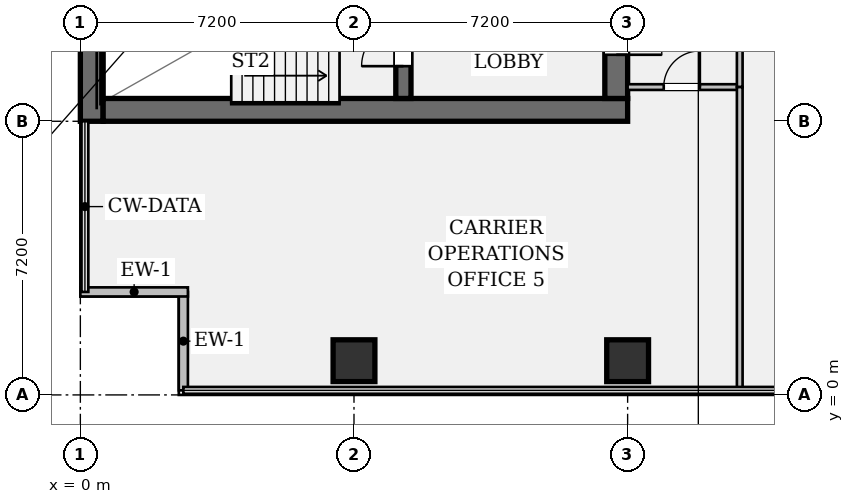
"""IFC4 building model, lengths in metres.
Left out: names, types, materials, properties, quantities, classifications, styles, units other than length and angle.
Written with IfcOpenShell. Run it as: python <this file> out.ifc"""

import sys

from ifc_helpers import new_model, si_unit, direction, frame, frame_2d, origin, origin_2d, place, context, subcontext, project, spatial, rectangle, hollow_rectangle, extrude, element, fill, save


model = new_model("IFC4")
c1 = context("Model", 3, precision=1e-05, world=origin(), true_north=direction((0.0, 1.0)))
c2 = subcontext(c1, "Body", "Model", "MODEL_VIEW")
j1 = project(units=[si_unit("LENGTHUNIT", "METRE"), si_unit("PLANEANGLEUNIT", "RADIAN")], contexts=[c1])
p1 = place(None, origin())
s1 = spatial("IfcSite", under=j1, at=p1, CompositionType="ELEMENT")
p2 = place(p1, origin())
s2 = spatial("IfcBuilding", under=s1, at=p2, CompositionType="ELEMENT")
p3 = place(p2, frame((0.0, 0.0, 31.15)))
s3 = spatial("IfcBuildingStorey", under=s2, at=p3, CompositionType="ELEMENT", Elevation=31.15)
p4 = place(p3, frame((0.3, 7.2, 0.0), z_axis=(0.0, 0.0, 1.0), x_axis=(0.0, 1.0, 0.0)))
e1 = element("IfcWall", 1, at=p4, inside=s3, PredefinedType="SHEAR", context=c2, shape_type="SweptSolid", body=[
    extrude(rectangle(XDim=28.8, YDim=0.6, at=frame_2d((14.4, 0.0))), origin(), (0.0, 0.0, 1.0), 3.57),
])
p5 = place(p3, frame((0.6, 7.5, 0.0), z_axis=(0.0, 0.0, 1.0), x_axis=(1.0, 0.0, 0.0)))
e2 = element("IfcWall", 2, at=p5, inside=s3, PredefinedType="SHEAR", context=c2, shape_type="SweptSolid", body=[
    extrude(rectangle(XDim=13.8, YDim=0.6, at=frame_2d((6.9, 0.0))), origin(), (0.0, 0.0, 1.0), 3.57),
])
p6 = place(p3, frame((14.1, 35.4, 0.0), z_axis=(0.0, 0.0, 1.0), x_axis=(0.0, -1.0, 0.0)))
e3 = element("IfcWall", 3, at=p6, inside=s3, PredefinedType="SHEAR", context=c2, shape_type="SweptSolid", body=[
    extrude(rectangle(XDim=27.6, YDim=0.6, at=frame_2d((13.8, 0.0))), origin(), (0.0, 0.0, 1.0), 3.57),
])
p7 = place(p6, frame((1.3, 0.0, 0.0)))
e4 = element("IfcOpeningElement", 4, at=p7, cuts=e3, PredefinedType="OPENING", context=c2, shape_type="SweptSolid", body=[
    extrude(rectangle(XDim=1.2, YDim=2.15, at=frame_2d((0.6, 1.075))), frame((0.0, 0.312, 0.0), z_axis=(0.0, -1.0, 0.0), x_axis=(1.0, 0.0, 0.0)), (0.0, 0.0, 1.0), 0.624),
])
p8 = place(p6, frame((25.25, 0.0, 0.0)))
e5 = element("IfcOpeningElement", 5, at=p8, cuts=e3, PredefinedType="OPENING", context=c2, shape_type="SweptSolid", body=[
    extrude(rectangle(XDim=1.2, YDim=2.15, at=frame_2d((0.6, 1.075))), frame((0.0, 0.312, 0.0), z_axis=(0.0, -1.0, 0.0), x_axis=(1.0, 0.0, 0.0)), (0.0, 0.0, 1.0), 0.624),
])
p9 = place(p6, frame((14.6, 0.0, 0.0)))
e6 = element("IfcOpeningElement", 6, at=p9, cuts=e3, PredefinedType="OPENING", context=c2, shape_type="SweptSolid", body=[
    extrude(rectangle(XDim=1.6, YDim=2.2, at=frame_2d((0.8, 1.1))), frame((0.0, 0.312, 0.0), z_axis=(0.0, -1.0, 0.0), x_axis=(1.0, 0.0, 0.0)), (0.0, 0.0, 1.0), 0.624),
])
p10 = place(p3, frame((8.5, 7.8, 0.0), z_axis=(0.0, 0.0, 1.0), x_axis=(0.0, 1.0, 0.0)))
e7 = element("IfcWall", 7, at=p10, inside=s3, PredefinedType="SHEAR", context=c2, shape_type="SweptSolid", body=[
    extrude(rectangle(XDim=3.68, YDim=0.4, at=frame_2d((1.84, 0.0))), origin(), (0.0, 0.0, 1.0), 3.57),
])
p11 = place(p10, frame((0.85, 0.0, 0.0)))
e8 = element("IfcOpeningElement", 8, at=p11, cuts=e7, PredefinedType="OPENING", context=c2, shape_type="SweptSolid", body=[
    extrude(rectangle(XDim=1.1, YDim=2.15, at=frame_2d((0.55, 1.075))), frame((0.0, 0.212, 0.0), z_axis=(0.0, -1.0, 0.0), x_axis=(1.0, 0.0, 0.0)), (0.0, 0.0, 1.0), 0.424),
])
for number, where, z_axis, x_axis in (
    (9, (7.2, 0.9, 0.0), (0.0, 0.0, 1.0), (1.0, 0.0, 0.0)),
    (10, (14.4, 0.9, 0.0), (0.0, 0.0, 1.0), (1.0, 0.0, 0.0)),
):
    element("IfcColumn", number, at=place(p3, frame(where, z_axis=z_axis, x_axis=x_axis)), inside=s3, PredefinedType="COLUMN", context=c2, shape_type="SweptSolid", body=[
        extrude(hollow_rectangle(XDim=1.1, YDim=1.1, WallThickness=0.07, at=origin_2d()), origin(), (0.0, 0.0, 1.0), 3.57),
    ])
p12 = place(p3, frame((2.71, 0.12, 0.0), z_axis=(0.0, 0.0, 1.0), x_axis=(0.0, 1.0, 0.0)))
e11 = element("IfcWall", 11, at=p12, inside=s3, PredefinedType="STANDARD", context=c2, shape_type="SweptSolid", body=[
    extrude(rectangle(XDim=2.59, YDim=0.24, at=frame_2d((1.295, 0.0))), origin(), (0.0, 0.0, 1.0), 3.57),
])
p13 = place(p3, frame((2.83, 2.71, 0.0), z_axis=(0.0, 0.0, 1.0), x_axis=(-1.0, 0.0, 0.0)))
e12 = element("IfcWall", 12, at=p13, inside=s3, PredefinedType="STANDARD", context=c2, shape_type="SweptSolid", body=[
    extrude(rectangle(XDim=2.83, YDim=0.24, at=frame_2d((1.415, 0.0))), origin(), (0.0, 0.0, 1.0), 3.57),
])
p14 = place(p3, frame((14.4, 8.1, 0.0), z_axis=(0.0, 0.0, 1.0), x_axis=(1.0, 0.0, 0.0)))
e13 = element("IfcWall", 13, at=p14, inside=s3, PredefinedType="PARTITIONING", context=c2, shape_type="SweptSolid", body=[
    extrude(rectangle(XDim=2.95, YDim=0.15, at=frame_2d((1.475, 0.0))), origin(), (0.0, 0.0, 1.0), 2.628),
])
p15 = place(p14, frame((0.95, 0.0, 0.0)))
e14 = element("IfcOpeningElement", 14, at=p15, cuts=e13, PredefinedType="OPENING", context=c2, shape_type="SweptSolid", body=[
    extrude(rectangle(XDim=0.95, YDim=2.15, at=frame_2d((0.475, 1.075))), frame((0.0, 0.087, 0.0), z_axis=(0.0, -1.0, 0.0), x_axis=(1.0, 0.0, 0.0)), (0.0, 0.0, 1.0), 0.174),
])
p16 = place(p3, frame((17.35, 8.1, 0.0), z_axis=(0.0, 0.0, 1.0), x_axis=(0.0, 1.0, 0.0)))
e15 = element("IfcWall", 15, at=p16, inside=s3, PredefinedType="PARTITIONING", context=c2, shape_type="SweptSolid", body=[
    extrude(rectangle(XDim=2.6, YDim=0.15, at=frame_2d((1.3, 0.0))), origin(), (0.0, 0.0, 1.0), 3.57),
])
p17 = place(p3, frame((17.35, 0.12, 0.0), z_axis=(0.0, 0.0, 1.0), x_axis=(0.0, 1.0, 0.0)))
e16 = element("IfcWall", 16, at=p17, inside=s3, PredefinedType="PARTITIONING", context=c2, shape_type="SweptSolid", body=[
    extrude(rectangle(XDim=7.98, YDim=0.15, at=frame_2d((3.99, 0.0))), origin(), (0.0, 0.0, 1.0), 2.628),
])
p18 = place(p11, origin())
e17 = element("IfcDoor", 17, at=p18, inside=s3, OperationType="SINGLE_SWING_LEFT", PredefinedType="DOOR", context=c2, shape_type="SweptSolid", body=[
    extrude(rectangle(XDim=1.1, YDim=2.15, at=frame_2d((0.55, 1.075))), frame((0.0, 0.025, 0.0), z_axis=(0.0, -1.0, 0.0), x_axis=(1.0, 0.0, 0.0)), (0.0, 0.0, 1.0), 0.05),
])
fill(e8, e17)
p19 = place(p8, origin())
e18 = element("IfcDoor", 18, at=p19, inside=s3, OperationType="SINGLE_SWING_RIGHT", PredefinedType="DOOR", context=c2, shape_type="SweptSolid", body=[
    extrude(rectangle(XDim=1.2, YDim=2.15, at=frame_2d((0.6, 1.075))), frame((0.0, 0.025, 0.0), z_axis=(0.0, -1.0, 0.0), x_axis=(1.0, 0.0, 0.0)), (0.0, 0.0, 1.0), 0.05),
])
fill(e5, e18)
p20 = place(p15, origin())
e19 = element("IfcDoor", 19, at=p20, inside=s3, OperationType="SINGLE_SWING_RIGHT", PredefinedType="DOOR", context=c2, shape_type="SweptSolid", body=[
    extrude(rectangle(XDim=0.95, YDim=2.15, at=frame_2d((0.475, 1.075))), frame((0.0, 0.025, 0.0), z_axis=(0.0, -1.0, 0.0), x_axis=(1.0, 0.0, 0.0)), (0.0, 0.0, 1.0), 0.05),
])
fill(e14, e19)
save(model, sys.argv[1])
